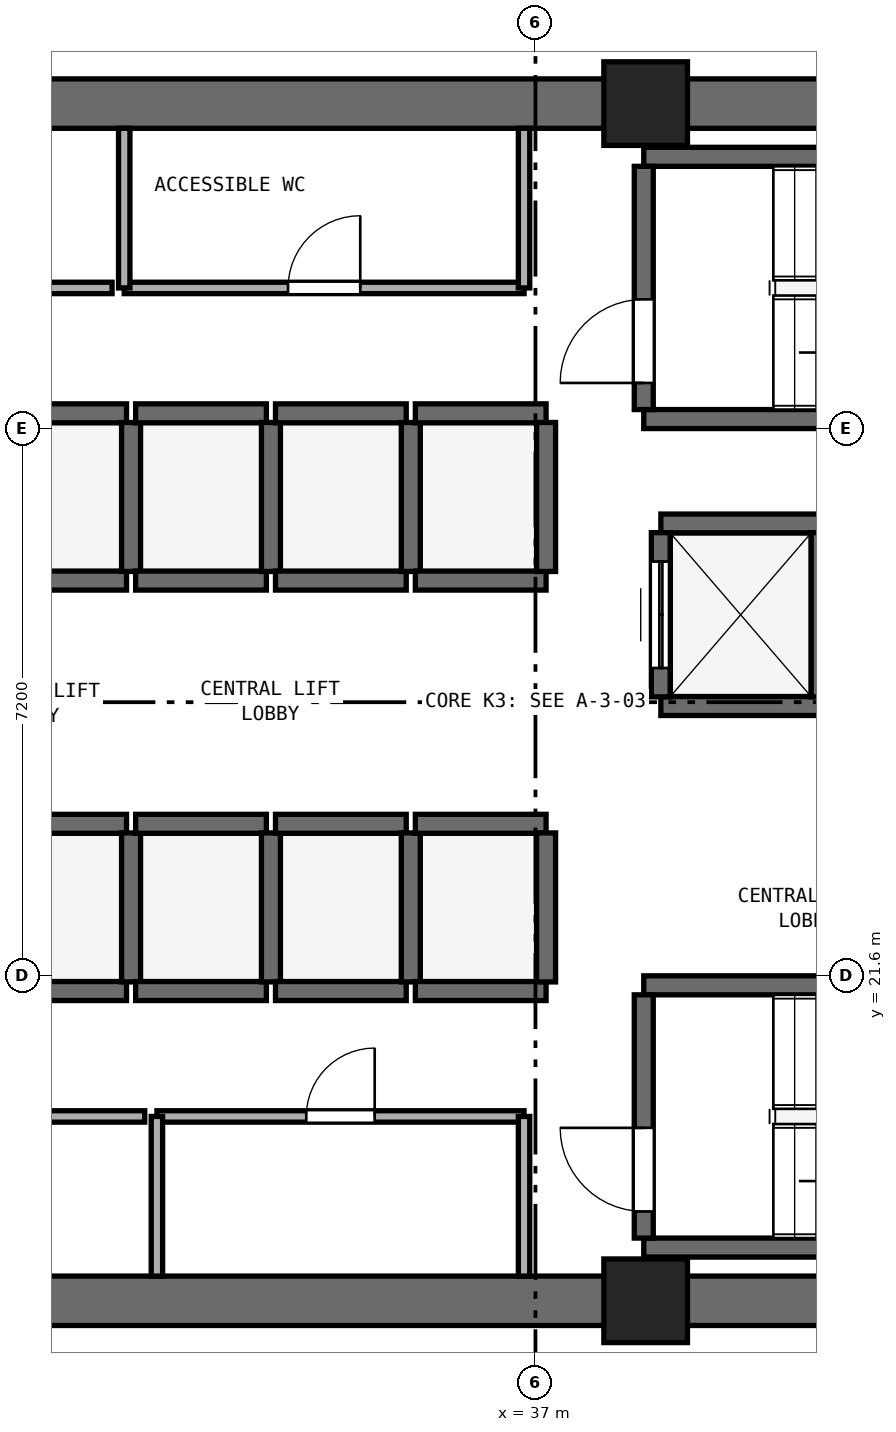
"""IFC4 building model, lengths in metres.
Left out: names, types, materials, properties, quantities, classifications, styles, units other than length and angle.
Written with IfcOpenShell. Run it as: python <this file> out.ifc"""

import sys

from ifc_helpers import new_model, si_unit, direction, frame, frame_2d, origin, origin_2d, place, context, subcontext, project, spatial, rectangle, extrude, element, fill, save


model = new_model("IFC4")
c1 = context("Model", 3, precision=1e-05, world=origin(), true_north=direction((0.0, 1.0)))
c2 = subcontext(c1, "Body", "Model", "MODEL_VIEW")
j1 = project(units=[si_unit("LENGTHUNIT", "METRE"), si_unit("PLANEANGLEUNIT", "RADIAN")], contexts=[c1])
p1 = place(None, origin())
s1 = spatial("IfcSite", under=j1, at=p1, CompositionType="ELEMENT")
p2 = place(p1, origin())
s2 = spatial("IfcBuilding", under=s1, at=p2, CompositionType="ELEMENT")
p3 = place(p2, frame((0.0, 0.0, 28.8)))
s3 = spatial("IfcBuildingStorey", under=s2, at=p3, CompositionType="ELEMENT", Elevation=28.8)
for number, where, z_axis, x_axis in (
    (1, (25.4, 17.325, 0.0), (0.0, 0.0, 1.0), (1.0, 0.0, 0.0)),
    (2, (25.4, 33.075, 0.0), (0.0, 0.0, 1.0), (1.0, 0.0, 0.0)),
):
    element("IfcWall", number, at=place(p3, frame(where, z_axis=z_axis, x_axis=x_axis)), inside=s3, PredefinedType="SHEAR", context=c2, shape_type="SweptSolid", body=[
        extrude(rectangle(XDim=23.2, YDim=0.65, at=frame_2d((11.6, 0.0))), origin(), (0.0, 0.0, 1.0), 3.525),
    ])
for number, where, z_axis, x_axis in (
    (3, (38.45, 17.325, 0.0), (0.0, 0.0, 1.0), (1.0, 0.0, 0.0)),
    (4, (38.45, 33.075, 0.0), (0.0, 0.0, 1.0), (1.0, 0.0, 0.0)),
):
    element("IfcColumn", number, at=place(p3, frame(where, z_axis=z_axis, x_axis=x_axis)), inside=s3, PredefinedType="PILASTER", context=c2, shape_type="SweptSolid", body=[
        extrude(rectangle(XDim=1.1, YDim=1.1, at=origin_2d()), origin(), (0.0, 0.0, 1.0), 3.8),
    ])
for number, where, z_axis, x_axis in (
    (5, (38.425, 28.925, 0.0), (0.0, 0.0, 1.0), (1.0, 0.0, 0.0)),
    (6, (38.425, 32.375, 0.0), (0.0, 0.0, 1.0), (1.0, 0.0, 0.0)),
):
    element("IfcWall", number, at=place(p3, frame(where, z_axis=z_axis, x_axis=x_axis)), inside=s3, PredefinedType="SHEAR", context=c2, shape_type="SweptSolid", body=[
        extrude(rectangle(XDim=7.3, YDim=0.25, at=frame_2d((3.65, 0.0))), origin(), (0.0, 0.0, 1.0), 3.525),
    ])
p4 = place(p3, frame((38.425, 29.05, 0.0), z_axis=(0.0, 0.0, 1.0), x_axis=(0.0, 1.0, 0.0)))
e7 = element("IfcWall", 7, at=p4, inside=s3, PredefinedType="SHEAR", context=c2, shape_type="SweptSolid", body=[
    extrude(rectangle(XDim=3.2, YDim=0.25, at=frame_2d((1.6, 0.0))), origin(), (0.0, 0.0, 1.0), 3.525),
])
p5 = place(p4, frame((0.35, 0.0, 0.0)))
e8 = element("IfcOpeningElement", 8, at=p5, cuts=e7, PredefinedType="OPENING", context=c2, shape_type="SweptSolid", body=[
    extrude(rectangle(XDim=1.1, YDim=2.15, at=frame_2d((0.55, 1.075))), frame((0.0, 0.135, 0.0), z_axis=(0.0, -1.0, 0.0), x_axis=(1.0, 0.0, 0.0)), (0.0, 0.0, 1.0), 0.27),
])
for number, where, z_axis, x_axis in (
    (9, (38.425, 18.025, 0.0), (0.0, 0.0, 1.0), (1.0, 0.0, 0.0)),
    (10, (38.425, 21.475, 0.0), (0.0, 0.0, 1.0), (1.0, 0.0, 0.0)),
):
    element("IfcWall", number, at=place(p3, frame(where, z_axis=z_axis, x_axis=x_axis)), inside=s3, PredefinedType="SHEAR", context=c2, shape_type="SweptSolid", body=[
        extrude(rectangle(XDim=7.3, YDim=0.25, at=frame_2d((3.65, 0.0))), origin(), (0.0, 0.0, 1.0), 3.525),
    ])
p6 = place(p3, frame((38.425, 18.15, 0.0), z_axis=(0.0, 0.0, 1.0), x_axis=(0.0, 1.0, 0.0)))
e11 = element("IfcWall", 11, at=p6, inside=s3, PredefinedType="SHEAR", context=c2, shape_type="SweptSolid", body=[
    extrude(rectangle(XDim=3.2, YDim=0.25, at=frame_2d((1.6, 0.0))), origin(), (0.0, 0.0, 1.0), 3.525),
])
p7 = place(p6, frame((0.35, 0.0, 0.0)))
e12 = element("IfcOpeningElement", 12, at=p7, cuts=e11, PredefinedType="OPENING", context=c2, shape_type="SweptSolid", body=[
    extrude(rectangle(XDim=1.1, YDim=2.15, at=frame_2d((0.55, 1.075))), frame((0.0, 0.135, 0.0), z_axis=(0.0, -1.0, 0.0), x_axis=(1.0, 0.0, 0.0)), (0.0, 0.0, 1.0), 0.27),
])
for number, where, z_axis, x_axis in (
    (13, (29.9, 21.4, 0.0), (0.0, 0.0, 1.0), (1.0, 0.0, 0.0)),
    (14, (29.9, 23.6, 0.0), (0.0, 0.0, 1.0), (1.0, 0.0, 0.0)),
):
    element("IfcWall", number, at=place(p3, frame(where, z_axis=z_axis, x_axis=x_axis)), inside=s3, PredefinedType="SHEAR", context=c2, shape_type="SweptSolid", body=[
        extrude(rectangle(XDim=1.72, YDim=0.25, at=frame_2d((0.86, 0.0))), origin(), (0.0, 0.0, 1.0), 3.525),
    ])
p8 = place(p3, frame((31.68, 21.52, 0.0), z_axis=(0.0, 0.0, 1.0), x_axis=(0.0, 1.0, 0.0)))
e15 = element("IfcWall", 15, at=p8, inside=s3, PredefinedType="SHEAR", context=c2, shape_type="SweptSolid", body=[
    extrude(rectangle(XDim=1.96, YDim=0.25, at=frame_2d((0.98, 0.0))), origin(), (0.0, 0.0, 1.0), 3.525),
])
for number, where, z_axis, x_axis in (
    (16, (31.74, 21.4, 0.0), (0.0, 0.0, 1.0), (1.0, 0.0, 0.0)),
    (17, (31.74, 23.6, 0.0), (0.0, 0.0, 1.0), (1.0, 0.0, 0.0)),
):
    element("IfcWall", number, at=place(p3, frame(where, z_axis=z_axis, x_axis=x_axis)), inside=s3, PredefinedType="SHEAR", context=c2, shape_type="SweptSolid", body=[
        extrude(rectangle(XDim=1.72, YDim=0.25, at=frame_2d((0.86, 0.0))), origin(), (0.0, 0.0, 1.0), 3.525),
    ])
p9 = place(p3, frame((33.52, 21.52, 0.0), z_axis=(0.0, 0.0, 1.0), x_axis=(0.0, 1.0, 0.0)))
e18 = element("IfcWall", 18, at=p9, inside=s3, PredefinedType="SHEAR", context=c2, shape_type="SweptSolid", body=[
    extrude(rectangle(XDim=1.96, YDim=0.25, at=frame_2d((0.98, 0.0))), origin(), (0.0, 0.0, 1.0), 3.525),
])
for number, where, z_axis, x_axis in (
    (19, (33.58, 21.4, 0.0), (0.0, 0.0, 1.0), (1.0, 0.0, 0.0)),
    (20, (33.58, 23.6, 0.0), (0.0, 0.0, 1.0), (1.0, 0.0, 0.0)),
):
    element("IfcWall", number, at=place(p3, frame(where, z_axis=z_axis, x_axis=x_axis)), inside=s3, PredefinedType="SHEAR", context=c2, shape_type="SweptSolid", body=[
        extrude(rectangle(XDim=1.72, YDim=0.25, at=frame_2d((0.86, 0.0))), origin(), (0.0, 0.0, 1.0), 3.525),
    ])
p10 = place(p3, frame((35.36, 21.52, 0.0), z_axis=(0.0, 0.0, 1.0), x_axis=(0.0, 1.0, 0.0)))
e21 = element("IfcWall", 21, at=p10, inside=s3, PredefinedType="SHEAR", context=c2, shape_type="SweptSolid", body=[
    extrude(rectangle(XDim=1.96, YDim=0.25, at=frame_2d((0.98, 0.0))), origin(), (0.0, 0.0, 1.0), 3.525),
])
for number, where, z_axis, x_axis in (
    (22, (35.42, 21.4, 0.0), (0.0, 0.0, 1.0), (1.0, 0.0, 0.0)),
    (23, (35.42, 23.6, 0.0), (0.0, 0.0, 1.0), (1.0, 0.0, 0.0)),
):
    element("IfcWall", number, at=place(p3, frame(where, z_axis=z_axis, x_axis=x_axis)), inside=s3, PredefinedType="SHEAR", context=c2, shape_type="SweptSolid", body=[
        extrude(rectangle(XDim=1.72, YDim=0.25, at=frame_2d((0.86, 0.0))), origin(), (0.0, 0.0, 1.0), 3.525),
    ])
p11 = place(p3, frame((37.14, 21.52, 0.0), z_axis=(0.0, 0.0, 1.0), x_axis=(0.0, 1.0, 0.0)))
e24 = element("IfcWall", 24, at=p11, inside=s3, PredefinedType="SHEAR", context=c2, shape_type="SweptSolid", body=[
    extrude(rectangle(XDim=1.96, YDim=0.25, at=frame_2d((0.98, 0.0))), origin(), (0.0, 0.0, 1.0), 3.525),
])
for number, where, z_axis, x_axis in (
    (25, (29.9, 26.8, 0.0), (0.0, 0.0, 1.0), (1.0, 0.0, 0.0)),
    (26, (29.9, 29.0, 0.0), (0.0, 0.0, 1.0), (1.0, 0.0, 0.0)),
):
    element("IfcWall", number, at=place(p3, frame(where, z_axis=z_axis, x_axis=x_axis)), inside=s3, PredefinedType="SHEAR", context=c2, shape_type="SweptSolid", body=[
        extrude(rectangle(XDim=1.72, YDim=0.25, at=frame_2d((0.86, 0.0))), origin(), (0.0, 0.0, 1.0), 3.525),
    ])
p12 = place(p3, frame((31.68, 26.92, 0.0), z_axis=(0.0, 0.0, 1.0), x_axis=(0.0, 1.0, 0.0)))
e27 = element("IfcWall", 27, at=p12, inside=s3, PredefinedType="SHEAR", context=c2, shape_type="SweptSolid", body=[
    extrude(rectangle(XDim=1.96, YDim=0.25, at=frame_2d((0.98, 0.0))), origin(), (0.0, 0.0, 1.0), 3.525),
])
for number, where, z_axis, x_axis in (
    (28, (31.74, 26.8, 0.0), (0.0, 0.0, 1.0), (1.0, 0.0, 0.0)),
    (29, (31.74, 29.0, 0.0), (0.0, 0.0, 1.0), (1.0, 0.0, 0.0)),
):
    element("IfcWall", number, at=place(p3, frame(where, z_axis=z_axis, x_axis=x_axis)), inside=s3, PredefinedType="SHEAR", context=c2, shape_type="SweptSolid", body=[
        extrude(rectangle(XDim=1.72, YDim=0.25, at=frame_2d((0.86, 0.0))), origin(), (0.0, 0.0, 1.0), 3.525),
    ])
p13 = place(p3, frame((33.52, 26.92, 0.0), z_axis=(0.0, 0.0, 1.0), x_axis=(0.0, 1.0, 0.0)))
e30 = element("IfcWall", 30, at=p13, inside=s3, PredefinedType="SHEAR", context=c2, shape_type="SweptSolid", body=[
    extrude(rectangle(XDim=1.96, YDim=0.25, at=frame_2d((0.98, 0.0))), origin(), (0.0, 0.0, 1.0), 3.525),
])
for number, where, z_axis, x_axis in (
    (31, (33.58, 26.8, 0.0), (0.0, 0.0, 1.0), (1.0, 0.0, 0.0)),
    (32, (33.58, 29.0, 0.0), (0.0, 0.0, 1.0), (1.0, 0.0, 0.0)),
):
    element("IfcWall", number, at=place(p3, frame(where, z_axis=z_axis, x_axis=x_axis)), inside=s3, PredefinedType="SHEAR", context=c2, shape_type="SweptSolid", body=[
        extrude(rectangle(XDim=1.72, YDim=0.25, at=frame_2d((0.86, 0.0))), origin(), (0.0, 0.0, 1.0), 3.525),
    ])
p14 = place(p3, frame((35.36, 26.92, 0.0), z_axis=(0.0, 0.0, 1.0), x_axis=(0.0, 1.0, 0.0)))
e33 = element("IfcWall", 33, at=p14, inside=s3, PredefinedType="SHEAR", context=c2, shape_type="SweptSolid", body=[
    extrude(rectangle(XDim=1.96, YDim=0.25, at=frame_2d((0.98, 0.0))), origin(), (0.0, 0.0, 1.0), 3.525),
])
for number, where, z_axis, x_axis in (
    (34, (35.42, 26.8, 0.0), (0.0, 0.0, 1.0), (1.0, 0.0, 0.0)),
    (35, (35.42, 29.0, 0.0), (0.0, 0.0, 1.0), (1.0, 0.0, 0.0)),
):
    element("IfcWall", number, at=place(p3, frame(where, z_axis=z_axis, x_axis=x_axis)), inside=s3, PredefinedType="SHEAR", context=c2, shape_type="SweptSolid", body=[
        extrude(rectangle(XDim=1.72, YDim=0.25, at=frame_2d((0.86, 0.0))), origin(), (0.0, 0.0, 1.0), 3.525),
    ])
p15 = place(p3, frame((37.14, 26.92, 0.0), z_axis=(0.0, 0.0, 1.0), x_axis=(0.0, 1.0, 0.0)))
e36 = element("IfcWall", 36, at=p15, inside=s3, PredefinedType="SHEAR", context=c2, shape_type="SweptSolid", body=[
    extrude(rectangle(XDim=1.96, YDim=0.25, at=frame_2d((0.98, 0.0))), origin(), (0.0, 0.0, 1.0), 3.525),
])
for number, where, z_axis, x_axis in (
    (37, (38.65, 25.15, 0.0), (0.0, 0.0, 1.0), (1.0, 0.0, 0.0)),
    (38, (38.65, 27.55, 0.0), (0.0, 0.0, 1.0), (1.0, 0.0, 0.0)),
):
    element("IfcWall", number, at=place(p3, frame(where, z_axis=z_axis, x_axis=x_axis)), inside=s3, PredefinedType="SHEAR", context=c2, shape_type="SweptSolid", body=[
        extrude(rectangle(XDim=2.1, YDim=0.25, at=frame_2d((1.05, 0.0))), origin(), (0.0, 0.0, 1.0), 3.525),
    ])
p16 = place(p3, frame((38.65, 25.27, 0.0), z_axis=(0.0, 0.0, 1.0), x_axis=(0.0, 1.0, 0.0)))
e39 = element("IfcWall", 39, at=p16, inside=s3, PredefinedType="SHEAR", context=c2, shape_type="SweptSolid", body=[
    extrude(rectangle(XDim=2.16, YDim=0.25, at=frame_2d((1.08, 0.0))), origin(), (0.0, 0.0, 1.0), 3.525),
])
p17 = place(p16, frame((0.38, 0.0, 0.0)))
e40 = element("IfcOpeningElement", 40, at=p17, cuts=e39, PredefinedType="OPENING", context=c2, shape_type="SweptSolid", body=[
    extrude(rectangle(XDim=1.4, YDim=2.2, at=frame_2d((0.7, 1.1))), frame((0.0, 0.135, 0.0), z_axis=(0.0, -1.0, 0.0), x_axis=(1.0, 0.0, 0.0)), (0.0, 0.0, 1.0), 0.27),
])
p18 = place(p3, frame((40.75, 25.27, 0.0), z_axis=(0.0, 0.0, 1.0), x_axis=(0.0, 1.0, 0.0)))
e41 = element("IfcWall", 41, at=p18, inside=s3, PredefinedType="SHEAR", context=c2, shape_type="SweptSolid", body=[
    extrude(rectangle(XDim=2.16, YDim=0.25, at=frame_2d((1.08, 0.0))), origin(), (0.0, 0.0, 1.0), 3.525),
])
p19 = place(p3, frame((26.17, 30.65, 0.0), z_axis=(0.0, 0.0, 1.0), x_axis=(1.0, 0.0, 0.0)))
e42 = element("IfcWall", 42, at=p19, inside=s3, PredefinedType="PARTITIONING", context=c2, shape_type="SweptSolid", body=[
    extrude(rectangle(XDim=5.26, YDim=0.15, at=frame_2d((2.63, 0.0))), origin(), (0.0, 0.0, 1.0), 3.525),
])
p20 = place(p19, frame((2.155, 0.0, 0.0)))
e43 = element("IfcOpeningElement", 43, at=p20, cuts=e42, PredefinedType="OPENING", context=c2, shape_type="SweptSolid", body=[
    extrude(rectangle(XDim=0.95, YDim=2.1, at=frame_2d((0.475, 1.05))), frame((0.0, 0.085, 0.0), z_axis=(0.0, -1.0, 0.0), x_axis=(1.0, 0.0, 0.0)), (0.0, 0.0, 1.0), 0.17),
])
p21 = place(p3, frame((31.59, 30.65, 0.0), z_axis=(0.0, 0.0, 1.0), x_axis=(1.0, 0.0, 0.0)))
e44 = element("IfcWall", 44, at=p21, inside=s3, PredefinedType="PARTITIONING", context=c2, shape_type="SweptSolid", body=[
    extrude(rectangle(XDim=5.26, YDim=0.15, at=frame_2d((2.63, 0.0))), origin(), (0.0, 0.0, 1.0), 3.525),
])
p22 = place(p21, frame((2.155, 0.0, 0.0)))
e45 = element("IfcOpeningElement", 45, at=p22, cuts=e44, PredefinedType="OPENING", context=c2, shape_type="SweptSolid", body=[
    extrude(rectangle(XDim=0.95, YDim=2.1, at=frame_2d((0.475, 1.05))), frame((0.0, 0.085, 0.0), z_axis=(0.0, -1.0, 0.0), x_axis=(1.0, 0.0, 0.0)), (0.0, 0.0, 1.0), 0.17),
])
for number, where, z_axis, x_axis in (
    (46, (31.59, 30.65, 0.0), (0.0, 0.0, 1.0), (0.0, 1.0, 0.0)),
    (47, (36.85, 30.65, 0.0), (0.0, 0.0, 1.0), (0.0, 1.0, 0.0)),
):
    element("IfcWall", number, at=place(p3, frame(where, z_axis=z_axis, x_axis=x_axis)), inside=s3, PredefinedType="PARTITIONING", context=c2, shape_type="SweptSolid", body=[
        extrude(rectangle(XDim=2.1, YDim=0.15, at=frame_2d((1.05, 0.0))), origin(), (0.0, 0.0, 1.0), 3.525),
    ])
p23 = place(p3, frame((26.17, 19.75, 0.0), z_axis=(0.0, 0.0, 1.0), x_axis=(1.0, 0.0, 0.0)))
e48 = element("IfcWall", 48, at=p23, inside=s3, PredefinedType="PARTITIONING", context=c2, shape_type="SweptSolid", body=[
    extrude(rectangle(XDim=5.69, YDim=0.15, at=frame_2d((2.845, 0.0))), origin(), (0.0, 0.0, 1.0), 3.525),
])
p24 = place(p23, frame((2.37, 0.0, 0.0)))
e49 = element("IfcOpeningElement", 49, at=p24, cuts=e48, PredefinedType="OPENING", context=c2, shape_type="SweptSolid", body=[
    extrude(rectangle(XDim=0.95, YDim=2.1, at=frame_2d((0.475, 1.05))), frame((0.0, 0.085, 0.0), z_axis=(0.0, -1.0, 0.0), x_axis=(1.0, 0.0, 0.0)), (0.0, 0.0, 1.0), 0.17),
])
p25 = place(p3, frame((32.02, 19.75, 0.0), z_axis=(0.0, 0.0, 1.0), x_axis=(1.0, 0.0, 0.0)))
e50 = element("IfcWall", 50, at=p25, inside=s3, PredefinedType="PARTITIONING", context=c2, shape_type="SweptSolid", body=[
    extrude(rectangle(XDim=4.83, YDim=0.15, at=frame_2d((2.415, 0.0))), origin(), (0.0, 0.0, 1.0), 3.525),
])
p26 = place(p25, frame((1.965, 0.0, 0.0)))
e51 = element("IfcOpeningElement", 51, at=p26, cuts=e50, PredefinedType="OPENING", context=c2, shape_type="SweptSolid", body=[
    extrude(rectangle(XDim=0.9, YDim=2.1, at=frame_2d((0.45, 1.05))), frame((0.0, 0.085, 0.0), z_axis=(0.0, -1.0, 0.0), x_axis=(1.0, 0.0, 0.0)), (0.0, 0.0, 1.0), 0.17),
])
for number, where, z_axis, x_axis in (
    (52, (32.02, 17.65, 0.0), (0.0, 0.0, 1.0), (0.0, 1.0, 0.0)),
    (53, (36.85, 17.65, 0.0), (0.0, 0.0, 1.0), (0.0, 1.0, 0.0)),
):
    element("IfcWall", number, at=place(p3, frame(where, z_axis=z_axis, x_axis=x_axis)), inside=s3, PredefinedType="PARTITIONING", context=c2, shape_type="SweptSolid", body=[
        extrude(rectangle(XDim=2.1, YDim=0.15, at=frame_2d((1.05, 0.0))), origin(), (0.0, 0.0, 1.0), 3.525),
    ])
p27 = place(p5, origin())
e54 = element("IfcDoor", 54, at=p27, inside=s3, OperationType="SINGLE_SWING_LEFT", PredefinedType="DOOR", context=c2, shape_type="SweptSolid", body=[
    extrude(rectangle(XDim=1.1, YDim=2.15, at=frame_2d((0.55, 1.075))), frame((0.0, 0.025, 0.0), z_axis=(0.0, -1.0, 0.0), x_axis=(1.0, 0.0, 0.0)), (0.0, 0.0, 1.0), 0.05),
])
fill(e8, e54)
p28 = place(p7, origin())
e55 = element("IfcDoor", 55, at=p28, inside=s3, OperationType="SINGLE_SWING_RIGHT", PredefinedType="DOOR", context=c2, shape_type="SweptSolid", body=[
    extrude(rectangle(XDim=1.1, YDim=2.15, at=frame_2d((0.55, 1.075))), frame((0.0, 0.025, 0.0), z_axis=(0.0, -1.0, 0.0), x_axis=(1.0, 0.0, 0.0)), (0.0, 0.0, 1.0), 0.05),
])
fill(e12, e55)
p29 = place(p17, origin())
e56 = element("IfcDoor", 56, at=p29, inside=s3, OperationType="DOUBLE_DOOR_SLIDING", PredefinedType="DOOR", context=c2, shape_type="SweptSolid", body=[
    extrude(rectangle(XDim=1.4, YDim=2.2, at=frame_2d((0.7, 1.1))), frame((0.0, 0.025, 0.0), z_axis=(0.0, -1.0, 0.0), x_axis=(1.0, 0.0, 0.0)), (0.0, 0.0, 1.0), 0.05),
])
fill(e40, e56)
p30 = place(p22, origin())
e57 = element("IfcDoor", 57, at=p30, inside=s3, OperationType="SINGLE_SWING_RIGHT", PredefinedType="DOOR", context=c2, shape_type="SweptSolid", body=[
    extrude(rectangle(XDim=0.95, YDim=2.1, at=frame_2d((0.475, 1.05))), frame((0.0, 0.025, 0.0), z_axis=(0.0, -1.0, 0.0), x_axis=(1.0, 0.0, 0.0)), (0.0, 0.0, 1.0), 0.05),
])
fill(e45, e57)
p31 = place(p26, origin())
e58 = element("IfcDoor", 58, at=p31, inside=s3, OperationType="SINGLE_SWING_RIGHT", PredefinedType="DOOR", context=c2, shape_type="SweptSolid", body=[
    extrude(rectangle(XDim=0.9, YDim=2.1, at=frame_2d((0.45, 1.05))), frame((0.0, 0.025, 0.0), z_axis=(0.0, -1.0, 0.0), x_axis=(1.0, 0.0, 0.0)), (0.0, 0.0, 1.0), 0.05),
])
fill(e51, e58)
save(model, sys.argv[1])
